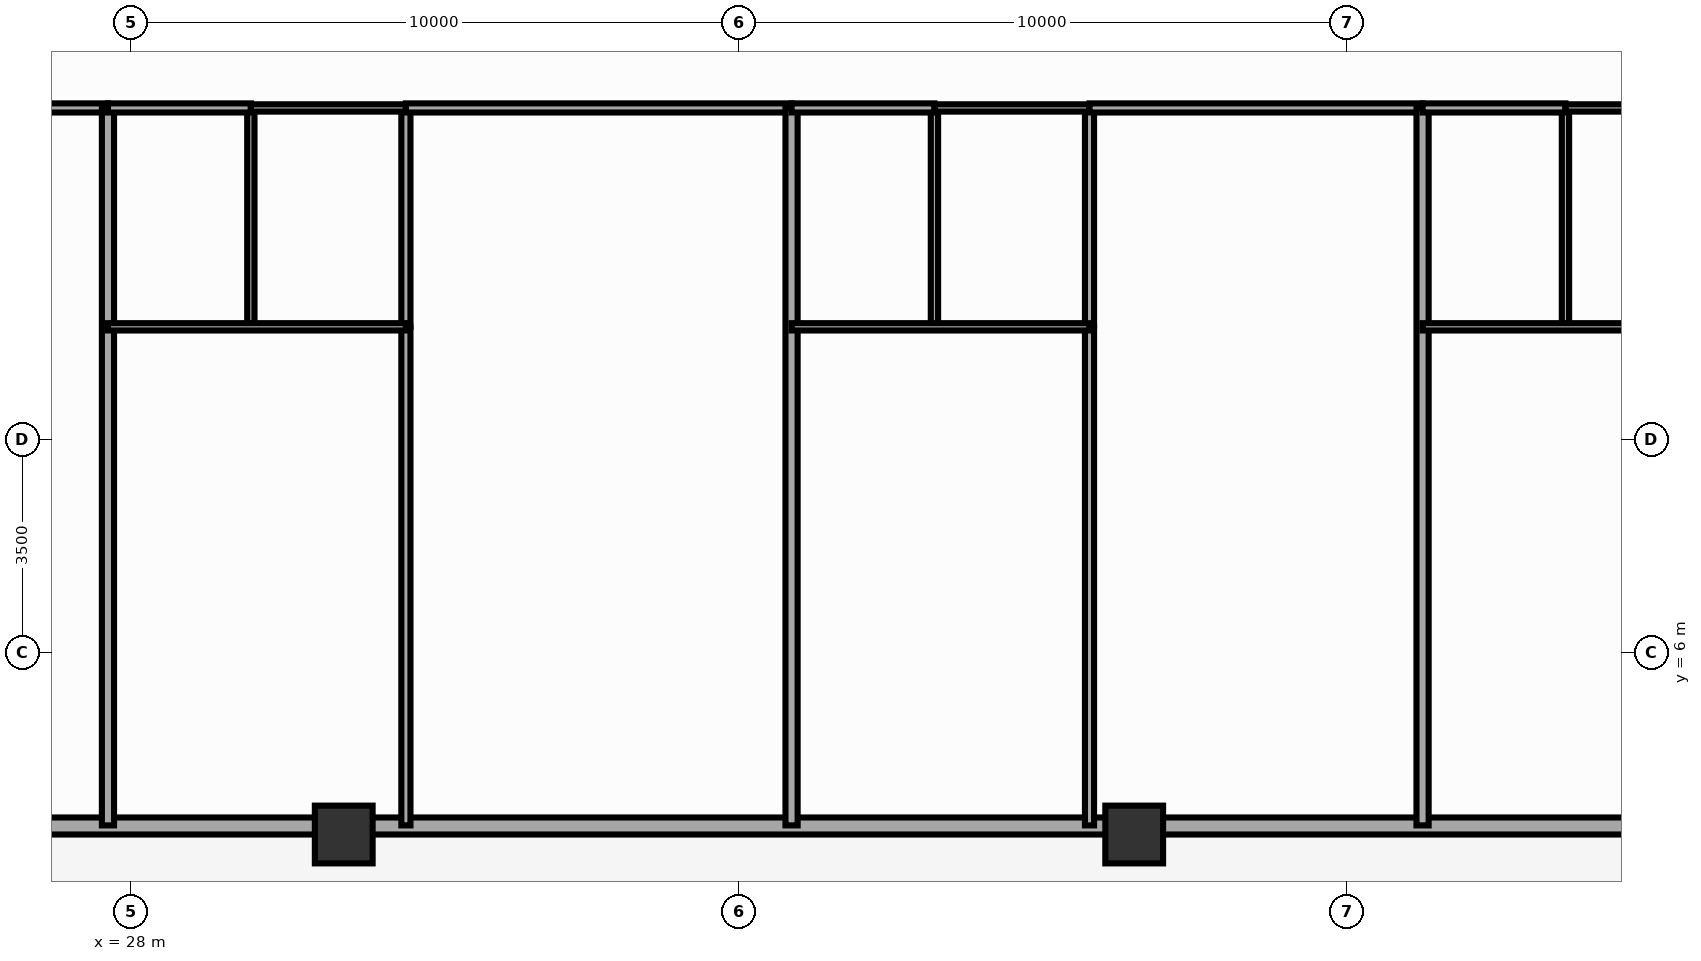
"""IFC4 building model, lengths in metres.
Left out: names, types, materials, properties, quantities, classifications, styles, units other than length and angle.
Written with IfcOpenShell. Run it as: python <this file> out.ifc"""

import sys

from ifc_helpers import new_model, si_unit, direction, frame, frame_2d, origin, origin_2d, place, context, subcontext, project, spatial, rectangle, extrude, source, transform, mapped, element, fill, save


model = new_model("IFC4")
c1 = context("Model", 3, precision=1e-05, world=origin(), true_north=direction((0.0, 1.0)))
c2 = subcontext(c1, "Body", "Model", "MODEL_VIEW")
j1 = project(units=[si_unit("LENGTHUNIT", "METRE"), si_unit("PLANEANGLEUNIT", "RADIAN")], contexts=[c1])
p1 = place(None, origin())
s1 = spatial("IfcSite", under=j1, at=p1, CompositionType="ELEMENT")
p2 = place(p1, origin())
s2 = spatial("IfcBuilding", under=s1, at=p2, CompositionType="ELEMENT")
p3 = place(p2, frame((0.0, 0.0, 74.35)))
s3 = spatial("IfcBuildingStorey", under=s2, at=p3, CompositionType="ELEMENT", Elevation=74.35)
m1 = source(origin(), c2, "Body", "SweptSolid", [
    extrude(rectangle(XDim=0.95, YDim=0.95, at=origin_2d()), origin(), (0.0, 0.0, 1.0), 3.5),
])
for number, where, z_axis, x_axis in (
    (1, (31.5, 3.0, 0.0), (0.0, 0.0, 1.0), (1.0, 0.0, 0.0)),
    (2, (44.5, 3.0, 0.0), (0.0, 0.0, 1.0), (1.0, 0.0, 0.0)),
):
    element("IfcColumn", number, at=place(p3, frame(where, z_axis=z_axis, x_axis=x_axis)), inside=s3, PredefinedType="COLUMN", context=c2, shape_type="MappedRepresentation", body=[
        mapped(m1, transform((0.0, 0.0, 0.0), scale=1.0)),
    ])
p4 = place(p3, frame((16.2, 3.14, 0.0), z_axis=(0.0, 0.0, 1.0), x_axis=(1.0, 0.0, 0.0)))
e3 = element("IfcWall", 3, at=p4, inside=s3, PredefinedType="SOLIDWALL", context=c2, shape_type="SweptSolid", body=[
    extrude(rectangle(XDim=43.6, YDim=0.28, at=frame_2d((21.8, 0.0))), origin(), (0.0, 0.0, 1.0), 2.78),
])
p5 = place(p4, frame((1.798, 0.0, 0.85)))
e4 = element("IfcOpeningElement", 4, at=p5, cuts=e3, PredefinedType="OPENING", context=c2, shape_type="SweptSolid", body=[
    extrude(rectangle(XDim=1.8, YDim=1.65, at=frame_2d((0.9, 0.825))), frame((0.0, 0.152, 0.0), z_axis=(0.0, -1.0, 0.0), x_axis=(1.0, 0.0, 0.0)), (0.0, 0.0, 1.0), 0.304),
])
p6 = place(p4, frame((7.351, 0.0, 0.85)))
e5 = element("IfcOpeningElement", 5, at=p6, cuts=e3, PredefinedType="OPENING", context=c2, shape_type="SweptSolid", body=[
    extrude(rectangle(XDim=1.8, YDim=1.65, at=frame_2d((0.9, 0.825))), frame((0.0, 0.152, 0.0), z_axis=(0.0, -1.0, 0.0), x_axis=(1.0, 0.0, 0.0)), (0.0, 0.0, 1.0), 0.304),
])
p7 = place(p4, frame((12.304, 0.0, 0.85)))
e6 = element("IfcOpeningElement", 6, at=p7, cuts=e3, PredefinedType="OPENING", context=c2, shape_type="SweptSolid", body=[
    extrude(rectangle(XDim=1.8, YDim=1.65, at=frame_2d((0.9, 0.825))), frame((0.0, 0.152, 0.0), z_axis=(0.0, -1.0, 0.0), x_axis=(1.0, 0.0, 0.0)), (0.0, 0.0, 1.0), 0.304),
])
p8 = place(p4, frame((20.044, 0.0, 0.0), z_axis=(0.0, 0.0, 1.0), x_axis=(-1.0, 0.0, 0.0)))
e7 = element("IfcOpeningElement", 7, at=p8, cuts=e3, PredefinedType="OPENING", context=c2, shape_type="SweptSolid", body=[
    extrude(rectangle(XDim=1.1, YDim=2.15, at=frame_2d((0.55, 1.075))), frame((0.0, 0.152, 0.0), z_axis=(0.0, -1.0, 0.0), x_axis=(1.0, 0.0, 0.0)), (0.0, 0.0, 1.0), 0.304),
])
p9 = place(p4, frame((24.215, 0.0, 0.85)))
e8 = element("IfcOpeningElement", 8, at=p9, cuts=e3, PredefinedType="OPENING", context=c2, shape_type="SweptSolid", body=[
    extrude(rectangle(XDim=1.8, YDim=1.65, at=frame_2d((0.9, 0.825))), frame((0.0, 0.152, 0.0), z_axis=(0.0, -1.0, 0.0), x_axis=(1.0, 0.0, 0.0)), (0.0, 0.0, 1.0), 0.304),
])
p10 = place(p4, frame((29.929, 0.0, 0.85)))
e9 = element("IfcOpeningElement", 9, at=p10, cuts=e3, PredefinedType="OPENING", context=c2, shape_type="SweptSolid", body=[
    extrude(rectangle(XDim=1.8, YDim=1.65, at=frame_2d((0.9, 0.825))), frame((0.0, 0.152, 0.0), z_axis=(0.0, -1.0, 0.0), x_axis=(1.0, 0.0, 0.0)), (0.0, 0.0, 1.0), 0.304),
])
p11 = place(p4, frame((34.592, 0.0, 0.85)))
e10 = element("IfcOpeningElement", 10, at=p11, cuts=e3, PredefinedType="OPENING", context=c2, shape_type="SweptSolid", body=[
    extrude(rectangle(XDim=1.8, YDim=1.65, at=frame_2d((0.9, 0.825))), frame((0.0, 0.152, 0.0), z_axis=(0.0, -1.0, 0.0), x_axis=(1.0, 0.0, 0.0)), (0.0, 0.0, 1.0), 0.304),
])
p12 = place(p4, frame((39.714, 0.0, 0.85)))
e11 = element("IfcOpeningElement", 11, at=p12, cuts=e3, PredefinedType="OPENING", context=c2, shape_type="SweptSolid", body=[
    extrude(rectangle(XDim=1.8, YDim=1.65, at=frame_2d((0.9, 0.825))), frame((0.0, 0.152, 0.0), z_axis=(0.0, -1.0, 0.0), x_axis=(1.0, 0.0, 0.0)), (0.0, 0.0, 1.0), 0.304),
])
p13 = place(p3, frame((21.28, 14.95, 0.0), z_axis=(0.0, 0.0, 1.0), x_axis=(1.0, 0.0, 0.0)))
e12 = element("IfcWall", 12, at=p13, inside=s3, PredefinedType="PARTITIONING", context=c2, shape_type="SweptSolid", body=[
    extrude(rectangle(XDim=6.342, YDim=0.15, at=frame_2d((3.171, 0.0))), origin(), (0.0, 0.0, 1.0), 3.29),
])
p14 = place(p13, frame((2.424, 0.0, 0.0)))
e13 = element("IfcOpeningElement", 13, at=p14, cuts=e12, PredefinedType="OPENING", context=c2, shape_type="SweptSolid", body=[
    extrude(rectangle(XDim=1.1, YDim=2.15, at=frame_2d((0.55, 1.075))), frame((0.0, 0.087, 0.0), z_axis=(0.0, -1.0, 0.0), x_axis=(1.0, 0.0, 0.0)), (0.0, 0.0, 1.0), 0.174),
])
p15 = place(p3, frame((27.622, 14.95, 0.0), z_axis=(0.0, 0.0, 1.0), x_axis=(0.0, -1.0, 0.0)))
e14 = element("IfcWall", 14, at=p15, inside=s3, PredefinedType="PARTITIONING", context=c2, shape_type="SweptSolid", body=[
    extrude(rectangle(XDim=11.8, YDim=0.2, at=frame_2d((5.9, 0.0))), origin(), (0.0, 0.0, 1.0), 3.29),
])
p16 = place(p3, frame((29.972, 14.95, 0.0), z_axis=(0.0, 0.0, 1.0), x_axis=(0.0, -1.0, 0.0)))
e15 = element("IfcWall", 15, at=p16, inside=s3, PredefinedType="PARTITIONING", context=c2, shape_type="SweptSolid", body=[
    extrude(rectangle(XDim=3.6, YDim=0.12, at=frame_2d((1.8, 0.0))), origin(), (0.0, 0.0, 1.0), 3.29),
])
p17 = place(p3, frame((32.522, 14.95, 0.0), z_axis=(0.0, 0.0, 1.0), x_axis=(0.0, -1.0, 0.0)))
e16 = element("IfcWall", 16, at=p17, inside=s3, PredefinedType="PARTITIONING", context=c2, shape_type="SweptSolid", body=[
    extrude(rectangle(XDim=3.6, YDim=0.15, at=frame_2d((1.8, 0.0))), origin(), (0.0, 0.0, 1.0), 3.29),
])
p18 = place(p3, frame((32.522, 11.35, 0.0), z_axis=(0.0, 0.0, 1.0), x_axis=(0.0, -1.0, 0.0)))
e17 = element("IfcWall", 17, at=p18, inside=s3, PredefinedType="PARTITIONING", context=c2, shape_type="SweptSolid", body=[
    extrude(rectangle(XDim=8.2, YDim=0.15, at=frame_2d((4.1, 0.0))), origin(), (0.0, 0.0, 1.0), 3.29),
])
p19 = place(p18, frame((3.65, 0.0, 0.0)))
e18 = element("IfcOpeningElement", 18, at=p19, cuts=e17, PredefinedType="OPENING", context=c2, shape_type="SweptSolid", body=[
    extrude(rectangle(XDim=0.9, YDim=2.1, at=frame_2d((0.45, 1.05))), frame((0.0, 0.087, 0.0), z_axis=(0.0, -1.0, 0.0), x_axis=(1.0, 0.0, 0.0)), (0.0, 0.0, 1.0), 0.174),
])
p20 = place(p3, frame((27.622, 11.35, 0.0), z_axis=(0.0, 0.0, 1.0), x_axis=(1.0, 0.0, 0.0)))
e19 = element("IfcWall", 19, at=p20, inside=s3, PredefinedType="PARTITIONING", context=c2, shape_type="SweptSolid", body=[
    extrude(rectangle(XDim=4.9, YDim=0.12, at=frame_2d((2.45, 0.0))), origin(), (0.0, 0.0, 1.0), 3.29),
])
p21 = place(p3, frame((27.622, 14.95, 0.0), z_axis=(0.0, 0.0, 1.0), x_axis=(1.0, 0.0, 0.0)))
e20 = element("IfcWall", 20, at=p21, inside=s3, PredefinedType="PARTITIONING", context=c2, shape_type="SweptSolid", body=[
    extrude(rectangle(XDim=2.35, YDim=0.15, at=frame_2d((1.175, 0.0))), origin(), (0.0, 0.0, 1.0), 3.29),
])
p22 = place(p21, frame((0.725, 0.0, 0.0)))
e21 = element("IfcOpeningElement", 21, at=p22, cuts=e20, PredefinedType="OPENING", context=c2, shape_type="SweptSolid", body=[
    extrude(rectangle(XDim=0.9, YDim=2.1, at=frame_2d((0.45, 1.05))), frame((0.0, 0.087, 0.0), z_axis=(0.0, -1.0, 0.0), x_axis=(1.0, 0.0, 0.0)), (0.0, 0.0, 1.0), 0.174),
])
p23 = place(p3, frame((29.972, 14.95, 0.0), z_axis=(0.0, 0.0, 1.0), x_axis=(1.0, 0.0, 0.0)))
e22 = element("IfcWall", 22, at=p23, inside=s3, PredefinedType="PARTITIONING", context=c2, shape_type="SweptSolid", body=[
    extrude(rectangle(XDim=2.55, YDim=0.12, at=frame_2d((1.275, 0.0))), origin(), (0.0, 0.0, 1.0), 3.29),
])
p24 = place(p23, frame((1.29, 0.0, 0.0)))
e23 = element("IfcOpeningElement", 23, at=p24, cuts=e22, PredefinedType="OPENING", context=c2, shape_type="SweptSolid", body=[
    extrude(rectangle(XDim=1.0, YDim=2.1, at=frame_2d((0.5, 1.05))), frame((0.0, 0.072, 0.0), z_axis=(0.0, -1.0, 0.0), x_axis=(1.0, 0.0, 0.0)), (0.0, 0.0, 1.0), 0.144),
])
p25 = place(p3, frame((32.522, 14.95, 0.0), z_axis=(0.0, 0.0, 1.0), x_axis=(1.0, 0.0, 0.0)))
e24 = element("IfcWall", 24, at=p25, inside=s3, PredefinedType="PARTITIONING", context=c2, shape_type="SweptSolid", body=[
    extrude(rectangle(XDim=6.342, YDim=0.15, at=frame_2d((3.171, 0.0))), origin(), (0.0, 0.0, 1.0), 3.29),
])
p26 = place(p25, frame((2.424, 0.0, 0.0)))
e25 = element("IfcOpeningElement", 25, at=p26, cuts=e24, PredefinedType="OPENING", context=c2, shape_type="SweptSolid", body=[
    extrude(rectangle(XDim=1.1, YDim=2.15, at=frame_2d((0.55, 1.075))), frame((0.0, 0.087, 0.0), z_axis=(0.0, -1.0, 0.0), x_axis=(1.0, 0.0, 0.0)), (0.0, 0.0, 1.0), 0.174),
])
p27 = place(p3, frame((38.865, 14.95, 0.0), z_axis=(0.0, 0.0, 1.0), x_axis=(0.0, -1.0, 0.0)))
e26 = element("IfcWall", 26, at=p27, inside=s3, PredefinedType="PARTITIONING", context=c2, shape_type="SweptSolid", body=[
    extrude(rectangle(XDim=11.8, YDim=0.2, at=frame_2d((5.9, 0.0))), origin(), (0.0, 0.0, 1.0), 3.29),
])
p28 = place(p3, frame((41.215, 14.95, 0.0), z_axis=(0.0, 0.0, 1.0), x_axis=(0.0, -1.0, 0.0)))
e27 = element("IfcWall", 27, at=p28, inside=s3, PredefinedType="PARTITIONING", context=c2, shape_type="SweptSolid", body=[
    extrude(rectangle(XDim=3.6, YDim=0.12, at=frame_2d((1.8, 0.0))), origin(), (0.0, 0.0, 1.0), 3.29),
])
p29 = place(p3, frame((43.765, 14.95, 0.0), z_axis=(0.0, 0.0, 1.0), x_axis=(0.0, -1.0, 0.0)))
e28 = element("IfcWall", 28, at=p29, inside=s3, PredefinedType="PARTITIONING", context=c2, shape_type="SweptSolid", body=[
    extrude(rectangle(XDim=3.6, YDim=0.15, at=frame_2d((1.8, 0.0))), origin(), (0.0, 0.0, 1.0), 3.29),
])
p30 = place(p3, frame((43.765, 11.35, 0.0), z_axis=(0.0, 0.0, 1.0), x_axis=(0.0, -1.0, 0.0)))
e29 = element("IfcWall", 29, at=p30, inside=s3, PredefinedType="PARTITIONING", context=c2, shape_type="SweptSolid", body=[
    extrude(rectangle(XDim=8.2, YDim=0.15, at=frame_2d((4.1, 0.0))), origin(), (0.0, 0.0, 1.0), 3.29),
])
p31 = place(p30, frame((3.65, 0.0, 0.0)))
e30 = element("IfcOpeningElement", 30, at=p31, cuts=e29, PredefinedType="OPENING", context=c2, shape_type="SweptSolid", body=[
    extrude(rectangle(XDim=0.9, YDim=2.1, at=frame_2d((0.45, 1.05))), frame((0.0, 0.087, 0.0), z_axis=(0.0, -1.0, 0.0), x_axis=(1.0, 0.0, 0.0)), (0.0, 0.0, 1.0), 0.174),
])
p32 = place(p3, frame((38.865, 11.35, 0.0), z_axis=(0.0, 0.0, 1.0), x_axis=(1.0, 0.0, 0.0)))
e31 = element("IfcWall", 31, at=p32, inside=s3, PredefinedType="PARTITIONING", context=c2, shape_type="SweptSolid", body=[
    extrude(rectangle(XDim=4.9, YDim=0.12, at=frame_2d((2.45, 0.0))), origin(), (0.0, 0.0, 1.0), 3.29),
])
p33 = place(p3, frame((38.865, 14.95, 0.0), z_axis=(0.0, 0.0, 1.0), x_axis=(1.0, 0.0, 0.0)))
e32 = element("IfcWall", 32, at=p33, inside=s3, PredefinedType="PARTITIONING", context=c2, shape_type="SweptSolid", body=[
    extrude(rectangle(XDim=2.35, YDim=0.15, at=frame_2d((1.175, 0.0))), origin(), (0.0, 0.0, 1.0), 3.29),
])
p34 = place(p33, frame((0.725, 0.0, 0.0)))
e33 = element("IfcOpeningElement", 33, at=p34, cuts=e32, PredefinedType="OPENING", context=c2, shape_type="SweptSolid", body=[
    extrude(rectangle(XDim=0.9, YDim=2.1, at=frame_2d((0.45, 1.05))), frame((0.0, 0.087, 0.0), z_axis=(0.0, -1.0, 0.0), x_axis=(1.0, 0.0, 0.0)), (0.0, 0.0, 1.0), 0.174),
])
p35 = place(p3, frame((41.215, 14.95, 0.0), z_axis=(0.0, 0.0, 1.0), x_axis=(1.0, 0.0, 0.0)))
e34 = element("IfcWall", 34, at=p35, inside=s3, PredefinedType="PARTITIONING", context=c2, shape_type="SweptSolid", body=[
    extrude(rectangle(XDim=2.55, YDim=0.12, at=frame_2d((1.275, 0.0))), origin(), (0.0, 0.0, 1.0), 3.29),
])
p36 = place(p35, frame((0.775, 0.0, 0.0)))
e35 = element("IfcOpeningElement", 35, at=p36, cuts=e34, PredefinedType="OPENING", context=c2, shape_type="SweptSolid", body=[
    extrude(rectangle(XDim=1.0, YDim=2.1, at=frame_2d((0.5, 1.05))), frame((0.0, 0.072, 0.0), z_axis=(0.0, -1.0, 0.0), x_axis=(1.0, 0.0, 0.0)), (0.0, 0.0, 1.0), 0.144),
])
p37 = place(p3, frame((43.765, 14.95, 0.0), z_axis=(0.0, 0.0, 1.0), x_axis=(1.0, 0.0, 0.0)))
e36 = element("IfcWall", 36, at=p37, inside=s3, PredefinedType="PARTITIONING", context=c2, shape_type="SweptSolid", body=[
    extrude(rectangle(XDim=5.478, YDim=0.15, at=frame_2d((2.739, 0.0))), origin(), (0.0, 0.0, 1.0), 3.29),
])
p38 = place(p37, frame((2.028, 0.0, 0.0)))
e37 = element("IfcOpeningElement", 37, at=p38, cuts=e36, PredefinedType="OPENING", context=c2, shape_type="SweptSolid", body=[
    extrude(rectangle(XDim=1.1, YDim=2.15, at=frame_2d((0.55, 1.075))), frame((0.0, 0.087, 0.0), z_axis=(0.0, -1.0, 0.0), x_axis=(1.0, 0.0, 0.0)), (0.0, 0.0, 1.0), 0.174),
])
p39 = place(p3, frame((49.242, 14.95, 0.0), z_axis=(0.0, 0.0, 1.0), x_axis=(0.0, -1.0, 0.0)))
e38 = element("IfcWall", 38, at=p39, inside=s3, PredefinedType="PARTITIONING", context=c2, shape_type="SweptSolid", body=[
    extrude(rectangle(XDim=11.8, YDim=0.2, at=frame_2d((5.9, 0.0))), origin(), (0.0, 0.0, 1.0), 3.29),
])
p40 = place(p3, frame((51.592, 14.95, 0.0), z_axis=(0.0, 0.0, 1.0), x_axis=(0.0, -1.0, 0.0)))
e39 = element("IfcWall", 39, at=p40, inside=s3, PredefinedType="PARTITIONING", context=c2, shape_type="SweptSolid", body=[
    extrude(rectangle(XDim=3.6, YDim=0.12, at=frame_2d((1.8, 0.0))), origin(), (0.0, 0.0, 1.0), 3.29),
])
p41 = place(p3, frame((49.242, 11.35, 0.0), z_axis=(0.0, 0.0, 1.0), x_axis=(1.0, 0.0, 0.0)))
e40 = element("IfcWall", 40, at=p41, inside=s3, PredefinedType="PARTITIONING", context=c2, shape_type="SweptSolid", body=[
    extrude(rectangle(XDim=4.9, YDim=0.12, at=frame_2d((2.45, 0.0))), origin(), (0.0, 0.0, 1.0), 3.29),
])
p42 = place(p3, frame((49.242, 14.95, 0.0), z_axis=(0.0, 0.0, 1.0), x_axis=(1.0, 0.0, 0.0)))
e41 = element("IfcWall", 41, at=p42, inside=s3, PredefinedType="PARTITIONING", context=c2, shape_type="SweptSolid", body=[
    extrude(rectangle(XDim=2.35, YDim=0.15, at=frame_2d((1.175, 0.0))), origin(), (0.0, 0.0, 1.0), 3.29),
])
p43 = place(p42, frame((0.725, 0.0, 0.0)))
e42 = element("IfcOpeningElement", 42, at=p43, cuts=e41, PredefinedType="OPENING", context=c2, shape_type="SweptSolid", body=[
    extrude(rectangle(XDim=0.9, YDim=2.1, at=frame_2d((0.45, 1.05))), frame((0.0, 0.087, 0.0), z_axis=(0.0, -1.0, 0.0), x_axis=(1.0, 0.0, 0.0)), (0.0, 0.0, 1.0), 0.174),
])
p44 = place(p3, frame((51.592, 14.95, 0.0), z_axis=(0.0, 0.0, 1.0), x_axis=(1.0, 0.0, 0.0)))
e43 = element("IfcWall", 43, at=p44, inside=s3, PredefinedType="PARTITIONING", context=c2, shape_type="SweptSolid", body=[
    extrude(rectangle(XDim=2.55, YDim=0.12, at=frame_2d((1.275, 0.0))), origin(), (0.0, 0.0, 1.0), 3.29),
])
p45 = place(p44, frame((0.775, 0.0, 0.0)))
e44 = element("IfcOpeningElement", 44, at=p45, cuts=e43, PredefinedType="OPENING", context=c2, shape_type="SweptSolid", body=[
    extrude(rectangle(XDim=1.0, YDim=2.1, at=frame_2d((0.5, 1.05))), frame((0.0, 0.072, 0.0), z_axis=(0.0, -1.0, 0.0), x_axis=(1.0, 0.0, 0.0)), (0.0, 0.0, 1.0), 0.144),
])
m2 = source(origin(), c2, "Body", "SweptSolid", [
    extrude(rectangle(XDim=1.8, YDim=1.65, at=frame_2d((0.9, 0.825))), frame((0.0, 0.03, 0.0), z_axis=(0.0, -1.0, 0.0), x_axis=(1.0, 0.0, 0.0)), (0.0, 0.0, 1.0), 0.06),
])
p46 = place(p7, origin())
e45 = element("IfcWindow", 45, at=p46, inside=s3, PartitioningType="SINGLE_PANEL", PredefinedType="WINDOW", context=c2, shape_type="MappedRepresentation", body=[
    mapped(m2, transform((0.0, 0.0, 0.0), scale=1.0)),
])
fill(e6, e45)
m3 = source(origin(), c2, "Body", "SweptSolid", [
    extrude(rectangle(XDim=1.1, YDim=2.15, at=frame_2d((0.55, 1.075))), frame((0.0, 0.025, 0.0), z_axis=(0.0, -1.0, 0.0), x_axis=(1.0, 0.0, 0.0)), (0.0, 0.0, 1.0), 0.05),
])
p47 = place(p8, origin())
e46 = element("IfcDoor", 46, at=p47, inside=s3, OperationType="SINGLE_SWING_RIGHT", PredefinedType="DOOR", context=c2, shape_type="MappedRepresentation", body=[
    mapped(m3, transform((0.0, 0.0, 0.0), scale=1.0)),
])
fill(e7, e46)
p48 = place(p9, origin())
e47 = element("IfcWindow", 47, at=p48, inside=s3, PartitioningType="SINGLE_PANEL", PredefinedType="WINDOW", context=c2, shape_type="MappedRepresentation", body=[
    mapped(m2, transform((0.0, 0.0, 0.0), scale=1.0)),
])
fill(e8, e47)
p49 = place(p10, origin())
e48 = element("IfcWindow", 48, at=p49, inside=s3, PartitioningType="SINGLE_PANEL", PredefinedType="WINDOW", context=c2, shape_type="MappedRepresentation", body=[
    mapped(m2, transform((0.0, 0.0, 0.0), scale=1.0)),
])
fill(e9, e48)
p50 = place(p11, origin())
e49 = element("IfcWindow", 49, at=p50, inside=s3, PartitioningType="SINGLE_PANEL", PredefinedType="WINDOW", context=c2, shape_type="MappedRepresentation", body=[
    mapped(m2, transform((0.0, 0.0, 0.0), scale=1.0)),
])
fill(e10, e49)
m4 = source(origin(), c2, "Body", "SweptSolid", [
    extrude(rectangle(XDim=0.9, YDim=2.1, at=frame_2d((0.45, 1.05))), frame((0.0, 0.025, 0.0), z_axis=(0.0, -1.0, 0.0), x_axis=(1.0, 0.0, 0.0)), (0.0, 0.0, 1.0), 0.05),
])
p51 = place(p19, origin())
e50 = element("IfcDoor", 50, at=p51, inside=s3, OperationType="SINGLE_SWING_RIGHT", PredefinedType="DOOR", context=c2, shape_type="MappedRepresentation", body=[
    mapped(m4, transform((0.0, 0.0, 0.0), scale=1.0)),
])
fill(e18, e50)
p52 = place(p22, origin())
e51 = element("IfcDoor", 51, at=p52, inside=s3, OperationType="SINGLE_SWING_LEFT", PredefinedType="DOOR", context=c2, shape_type="MappedRepresentation", body=[
    mapped(m4, transform((0.0, 0.0, 0.0), scale=1.0)),
])
fill(e21, e51)
m5 = source(origin(), c2, "Body", "SweptSolid", [
    extrude(rectangle(XDim=1.0, YDim=2.1, at=frame_2d((0.5, 1.05))), frame((0.0, 0.025, 0.0), z_axis=(0.0, -1.0, 0.0), x_axis=(1.0, 0.0, 0.0)), (0.0, 0.0, 1.0), 0.05),
])
p53 = place(p24, origin())
e52 = element("IfcDoor", 52, at=p53, inside=s3, OperationType="SINGLE_SWING_RIGHT", PredefinedType="DOOR", context=c2, shape_type="MappedRepresentation", body=[
    mapped(m5, transform((0.0, 0.0, 0.0), scale=1.0)),
])
fill(e23, e52)
p54 = place(p26, origin())
e53 = element("IfcDoor", 53, at=p54, inside=s3, OperationType="SINGLE_SWING_LEFT", PredefinedType="DOOR", context=c2, shape_type="MappedRepresentation", body=[
    mapped(m3, transform((0.0, 0.0, 0.0), scale=1.0)),
])
fill(e25, e53)
p55 = place(p31, origin())
e54 = element("IfcDoor", 54, at=p55, inside=s3, OperationType="SINGLE_SWING_RIGHT", PredefinedType="DOOR", context=c2, shape_type="MappedRepresentation", body=[
    mapped(m4, transform((0.0, 0.0, 0.0), scale=1.0)),
])
fill(e30, e54)
p56 = place(p34, origin())
e55 = element("IfcDoor", 55, at=p56, inside=s3, OperationType="SINGLE_SWING_LEFT", PredefinedType="DOOR", context=c2, shape_type="MappedRepresentation", body=[
    mapped(m4, transform((0.0, 0.0, 0.0), scale=1.0)),
])
fill(e33, e55)
p57 = place(p36, origin())
e56 = element("IfcDoor", 56, at=p57, inside=s3, OperationType="SINGLE_SWING_RIGHT", PredefinedType="DOOR", context=c2, shape_type="MappedRepresentation", body=[
    mapped(m5, transform((0.0, 0.0, 0.0), scale=1.0)),
])
fill(e35, e56)
p58 = place(p38, origin())
e57 = element("IfcDoor", 57, at=p58, inside=s3, OperationType="SINGLE_SWING_LEFT", PredefinedType="DOOR", context=c2, shape_type="MappedRepresentation", body=[
    mapped(m3, transform((0.0, 0.0, 0.0), scale=1.0)),
])
fill(e37, e57)
p59 = place(p43, origin())
e58 = element("IfcDoor", 58, at=p59, inside=s3, OperationType="SINGLE_SWING_LEFT", PredefinedType="DOOR", context=c2, shape_type="MappedRepresentation", body=[
    mapped(m4, transform((0.0, 0.0, 0.0), scale=1.0)),
])
fill(e42, e58)
p60 = place(p45, origin())
e59 = element("IfcDoor", 59, at=p60, inside=s3, OperationType="SINGLE_SWING_RIGHT", PredefinedType="DOOR", context=c2, shape_type="MappedRepresentation", body=[
    mapped(m5, transform((0.0, 0.0, 0.0), scale=1.0)),
])
fill(e44, e59)
save(model, sys.argv[1])
